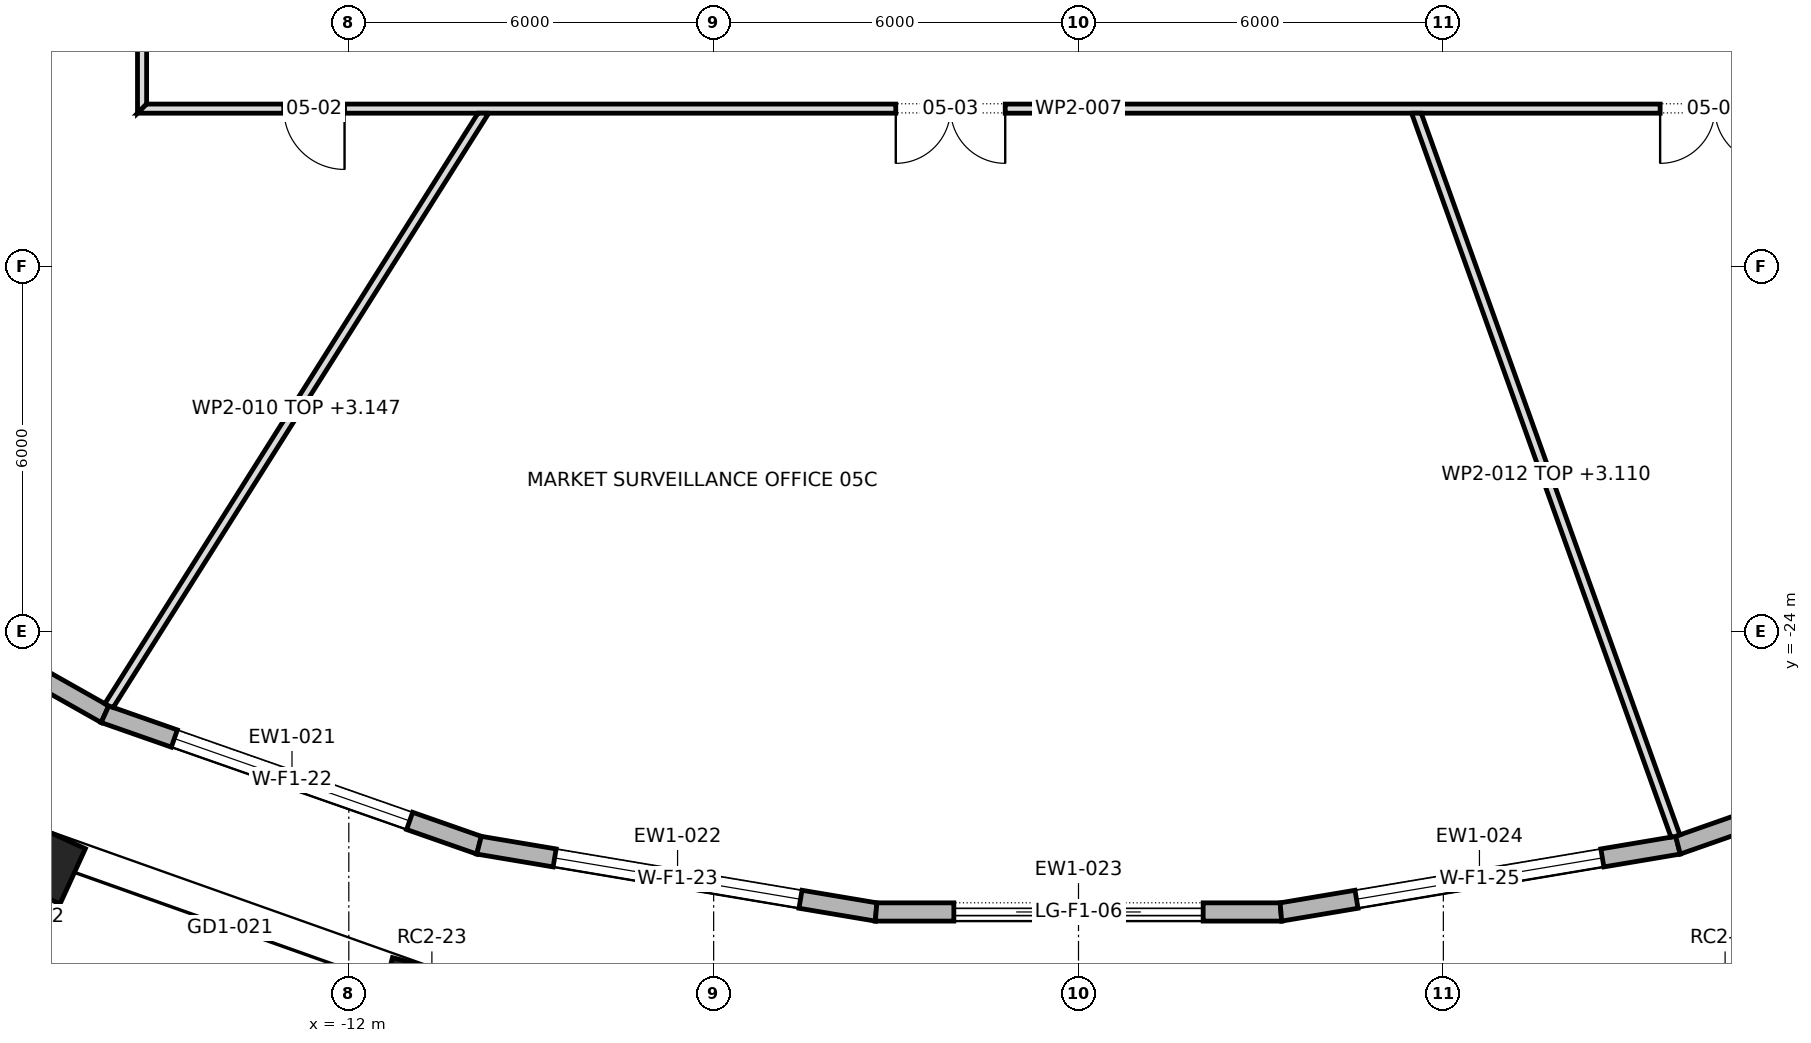
"""IFC4 building model, lengths in metres.
Left out: names, types, materials, properties, quantities, classifications, styles, units other than length and angle.
Written with IfcOpenShell. Run it as: python <this file> out.ifc"""

import sys

from ifc_helpers import new_model, si_unit, direction, frame, frame_2d, origin, origin_2d, place, context, subcontext, project, spatial, polyline, rectangle, outline, extrude, element, fill, save


model = new_model("IFC4")
c1 = context("Model", 3, precision=1e-05, world=origin(), true_north=direction((0.0, 1.0)))
c2 = subcontext(c1, "Body", "Model", "MODEL_VIEW")
j1 = project(units=[si_unit("LENGTHUNIT", "METRE"), si_unit("PLANEANGLEUNIT", "RADIAN")], contexts=[c1])
p1 = place(None, origin())
s1 = spatial("IfcSite", under=j1, at=p1, CompositionType="ELEMENT")
p2 = place(p1, origin())
s2 = spatial("IfcBuilding", under=s1, at=p2, CompositionType="ELEMENT")
p3 = place(p2, frame((0.0, 0.0, 73.9)))
s3 = spatial("IfcBuildingStorey", under=s2, at=p3, CompositionType="ELEMENT", Elevation=73.9)
for number, where, z_axis, x_axis in (
    (1, (-17.268, -27.691, 0.0), (0.0, 0.0, 1.0), (0.909, -0.417, 0.0)),
    (2, (-10.634, -30.046, 0.0), (0.0, 0.0, 1.0), (0.968, -0.252, 0.0)),
    (3, (10.634, -30.046, 0.0), (0.0, 0.0, 1.0), (0.968, 0.252, 0.0)),
):
    element("IfcColumn", number, at=place(p3, frame(where, z_axis=z_axis, x_axis=x_axis)), inside=s3, PredefinedType="COLUMN", context=c2, shape_type="SweptSolid", body=[
        extrude(rectangle(XDim=1.6, YDim=1.0, at=origin_2d()), origin(), (0.0, 0.0, 1.0), 4.2),
    ])
p4 = place(p3, frame((-21.549, -22.231, 0.0), z_axis=(0.0, 0.0, 1.0), x_axis=(0.870710061474, -0.491796694629, 0.0)))
e4 = element("IfcWall", 4, at=p4, inside=s3, PredefinedType="STANDARD", context=c2, shape_type="SweptSolid", body=[
    extrude(outline(polyline([(-0.014, -0.15), (6.374, -0.15), (6.347, 0.15), (0.014, 0.15), (-0.014, -0.15)])), origin(), (0.0, 0.0, 1.0), 3.9),
])
p5 = place(p4, frame((1.13, 0.0, 0.6)))
e5 = element("IfcOpeningElement", 5, at=p5, cuts=e4, PredefinedType="OPENING", context=c2, shape_type="SweptSolid", body=[
    extrude(rectangle(XDim=4.1, YDim=2.85, at=frame_2d((2.05, 1.425))), frame((0.0, 0.162, 0.0), z_axis=(0.0, -1.0, 0.0), x_axis=(1.0, 0.0, 0.0)), (0.0, 0.0, 1.0), 0.324),
])
p6 = place(p3, frame((-16.01, -25.359, 0.0), z_axis=(0.0, 0.0, 1.0), x_axis=(0.943815136299, -0.330473884736, 0.0)))
e6 = element("IfcWall", 6, at=p6, inside=s3, PredefinedType="STANDARD", context=c2, shape_type="SweptSolid", body=[
    extrude(outline(polyline([(-0.013, -0.15), (6.531, -0.15), (6.505, 0.15), (0.013, 0.15), (-0.013, -0.15)])), origin(), (0.0, 0.0, 1.0), 3.9),
])
p7 = place(p6, frame((1.209, 0.0, 0.6)))
e7 = element("IfcOpeningElement", 7, at=p7, cuts=e6, PredefinedType="OPENING", context=c2, shape_type="SweptSolid", body=[
    extrude(rectangle(XDim=4.1, YDim=2.85, at=frame_2d((2.05, 1.425))), frame((0.0, 0.162, 0.0), z_axis=(0.0, -1.0, 0.0), x_axis=(1.0, 0.0, 0.0)), (0.0, 0.0, 1.0), 0.324),
])
p8 = place(p3, frame((-9.858, -27.513, 0.0), z_axis=(0.0, 0.0, 1.0), x_axis=(0.986157735925, -0.165809890767, 0.0)))
e8 = element("IfcWall", 8, at=p8, inside=s3, PredefinedType="STANDARD", context=c2, shape_type="SweptSolid", body=[
    extrude(outline(polyline([(-0.013, -0.15), (6.634, -0.15), (6.609, 0.15), (0.013, 0.15), (-0.013, -0.15)])), origin(), (0.0, 0.0, 1.0), 3.9),
])
p9 = place(p8, frame((1.261, 0.0, 0.6)))
e9 = element("IfcOpeningElement", 9, at=p9, cuts=e8, PredefinedType="OPENING", context=c2, shape_type="SweptSolid", body=[
    extrude(rectangle(XDim=4.1, YDim=2.85, at=frame_2d((2.05, 1.425))), frame((0.0, 0.162, 0.0), z_axis=(0.0, -1.0, 0.0), x_axis=(1.0, 0.0, 0.0)), (0.0, 0.0, 1.0), 0.324),
])
p10 = place(p3, frame((-3.329, -28.611, 0.0), z_axis=(0.0, 0.0, 1.0), x_axis=(1.0, 0.0, 0.0)))
e10 = element("IfcWall", 10, at=p10, inside=s3, PredefinedType="STANDARD", context=c2, shape_type="SweptSolid", body=[
    extrude(outline(polyline([(-0.012, -0.15), (6.67, -0.15), (6.645, 0.15), (0.012, 0.15), (-0.012, -0.15)])), origin(), (0.0, 0.0, 1.0), 3.9),
])
p11 = place(p10, frame((1.279, 0.0, 0.0)))
e11 = element("IfcOpeningElement", 11, at=p11, cuts=e10, PredefinedType="OPENING", context=c2, shape_type="SweptSolid", body=[
    extrude(rectangle(XDim=4.1, YDim=3.45, at=frame_2d((2.05, 1.725))), frame((0.0, 0.162, 0.0), z_axis=(0.0, -1.0, 0.0), x_axis=(1.0, 0.0, 0.0)), (0.0, 0.0, 1.0), 0.324),
])
p12 = place(p3, frame((3.329, -28.611, 0.0), z_axis=(0.0, 0.0, 1.0), x_axis=(0.986157735925, 0.165809890767, 0.0)))
e12 = element("IfcWall", 12, at=p12, inside=s3, PredefinedType="STANDARD", context=c2, shape_type="SweptSolid", body=[
    extrude(outline(polyline([(-0.012, -0.15), (6.634, -0.15), (6.609, 0.15), (0.012, 0.15), (-0.012, -0.15)])), origin(), (0.0, 0.0, 1.0), 3.9),
])
p13 = place(p12, frame((1.261, 0.0, 0.6)))
e13 = element("IfcOpeningElement", 13, at=p13, cuts=e12, PredefinedType="OPENING", context=c2, shape_type="SweptSolid", body=[
    extrude(rectangle(XDim=4.1, YDim=2.85, at=frame_2d((2.05, 1.425))), frame((0.0, 0.162, 0.0), z_axis=(0.0, -1.0, 0.0), x_axis=(1.0, 0.0, 0.0)), (0.0, 0.0, 1.0), 0.324),
])
p14 = place(p3, frame((9.858, -27.513, 0.0), z_axis=(0.0, 0.0, 1.0), x_axis=(0.943815136299, 0.330473884736, 0.0)))
e14 = element("IfcWall", 14, at=p14, inside=s3, PredefinedType="STANDARD", context=c2, shape_type="SweptSolid", body=[
    extrude(outline(polyline([(-0.013, -0.15), (6.531, -0.15), (6.505, 0.15), (0.013, 0.15), (-0.013, -0.15)])), origin(), (0.0, 0.0, 1.0), 3.9),
])
p15 = place(p14, frame((1.209, 0.0, 0.6)))
e15 = element("IfcOpeningElement", 15, at=p15, cuts=e14, PredefinedType="OPENING", context=c2, shape_type="SweptSolid", body=[
    extrude(rectangle(XDim=4.1, YDim=2.85, at=frame_2d((2.05, 1.425))), frame((0.0, 0.162, 0.0), z_axis=(0.0, -1.0, 0.0), x_axis=(1.0, 0.0, 0.0)), (0.0, 0.0, 1.0), 0.324),
])
p16 = place(p3, frame((-26.158, -18.142, 0.0), z_axis=(0.0, 0.0, 1.0), x_axis=(0.821670699987, 0.569962508226, 0.0)))
e16 = element("IfcWall", 16, at=p16, inside=s3, PredefinedType="PARTITIONING", context=c2, shape_type="SweptSolid", body=[
    extrude(outline(polyline([(0.024, -0.075), (1.87, -0.075), (3.717, -0.075), (5.563, -0.075), (7.41, -0.075), (9.257, -0.075), (11.103, -0.075), (12.95, -0.075), (13.003, 0.002), (13.003, 0.002), (13.053, 0.074), (13.053, 0.075), (11.279, 0.075), (9.504, 0.075), (7.729, 0.075), (7.728, 0.073), (7.726, 0.075), (5.794, 0.075), (3.863, 0.075), (1.931, 0.075), (0.0, 0.075), (0.0, 0.073), (0.005, -0.004), (0.024, -0.075)])), origin(), (0.0, 0.0, 1.0), 2.91),
])
p17 = place(p3, frame((-15.4, -15.475, 0.0), z_axis=(0.0, 0.0, 1.0), x_axis=(0.0, 1.0, 0.0)))
e17 = element("IfcWall", 17, at=p17, inside=s3, PredefinedType="PARTITIONING", context=c2, shape_type="SweptSolid", body=[
    extrude(outline(polyline([(0.15, -0.075), (2.066, -0.075), (3.981, -0.075), (5.897, -0.075), (7.812, -0.075), (9.728, -0.075), (11.644, -0.075), (13.56, -0.075), (15.475, -0.075), (17.391, -0.075), (19.306, -0.075), (21.222, -0.075), (23.138, -0.075), (25.053, -0.075), (26.969, -0.075), (28.885, -0.075), (30.8, -0.075), (30.95, 0.075), (29.016, 0.075), (27.081, 0.075), (25.147, 0.075), (23.212, 0.075), (21.278, 0.075), (19.344, 0.075), (17.409, 0.075), (15.475, 0.075), (13.541, 0.075), (11.606, 0.075), (9.672, 0.075), (7.738, 0.075), (5.803, 0.075), (3.869, 0.075), (1.935, 0.075), (0.0, 0.075), (0.15, -0.075)])), origin(), (0.0, 0.0, 1.0), 3.9),
])
p18 = place(p17, frame((10.275, 0.0, 0.0)))
e18 = element("IfcOpeningElement", 18, at=p18, cuts=e17, PredefinedType="OPENING", context=c2, shape_type="SweptSolid", body=[
    extrude(rectangle(XDim=1.0, YDim=2.1, at=frame_2d((0.5, 1.05))), frame((0.0, 0.087, 0.0), z_axis=(0.0, -1.0, 0.0), x_axis=(1.0, 0.0, 0.0)), (0.0, 0.0, 1.0), 0.174),
])
p19 = place(p17, frame((22.915, 0.0, 0.0)))
e19 = element("IfcOpeningElement", 19, at=p19, cuts=e17, PredefinedType="OPENING", context=c2, shape_type="SweptSolid", body=[
    extrude(rectangle(XDim=1.8, YDim=2.1, at=frame_2d((0.9, 1.05))), frame((0.0, 0.087, 0.0), z_axis=(0.0, -1.0, 0.0), x_axis=(1.0, 0.0, 0.0)), (0.0, 0.0, 1.0), 0.174),
])
p20 = place(p3, frame((-15.475, -15.4, 0.0), z_axis=(0.0, 0.0, 1.0), x_axis=(1.0, 0.0, 0.0)))
e20 = element("IfcWall", 20, at=p20, inside=s3, PredefinedType="PARTITIONING", context=c2, shape_type="SweptSolid", body=[
    extrude(outline(polyline([(0.0, -0.075), (1.935, -0.075), (3.869, -0.075), (5.803, -0.075), (7.738, -0.075), (9.672, -0.075), (11.606, -0.075), (13.541, -0.075), (15.475, -0.075), (17.409, -0.075), (19.344, -0.075), (21.278, -0.075), (23.212, -0.075), (25.147, -0.075), (27.081, -0.075), (29.016, -0.075), (30.95, -0.075), (30.8, 0.075), (28.885, 0.075), (26.969, 0.075), (25.053, 0.075), (23.138, 0.075), (21.222, 0.075), (19.306, 0.075), (17.391, 0.075), (15.475, 0.075), (13.56, 0.075), (11.644, 0.075), (9.728, 0.075), (7.812, 0.075), (5.897, 0.075), (3.981, 0.075), (2.066, 0.075), (0.15, 0.075), (0.0, -0.075)])), origin(), (0.0, 0.0, 1.0), 3.9),
])
p21 = place(p20, frame((2.405, 0.0, 0.0)))
e21 = element("IfcOpeningElement", 21, at=p21, cuts=e20, PredefinedType="OPENING", context=c2, shape_type="SweptSolid", body=[
    extrude(rectangle(XDim=1.0, YDim=2.1, at=frame_2d((0.5, 1.05))), frame((0.0, 0.087, 0.0), z_axis=(0.0, -1.0, 0.0), x_axis=(1.0, 0.0, 0.0)), (0.0, 0.0, 1.0), 0.174),
])
p22 = place(p20, frame((12.47, 0.0, 0.0)))
e22 = element("IfcOpeningElement", 22, at=p22, cuts=e20, PredefinedType="OPENING", context=c2, shape_type="SweptSolid", body=[
    extrude(rectangle(XDim=1.8, YDim=2.1, at=frame_2d((0.9, 1.05))), frame((0.0, 0.087, 0.0), z_axis=(0.0, -1.0, 0.0), x_axis=(1.0, 0.0, 0.0)), (0.0, 0.0, 1.0), 0.174),
])
p23 = place(p20, frame((25.04, 0.0, 0.0)))
e23 = element("IfcOpeningElement", 23, at=p23, cuts=e20, PredefinedType="OPENING", context=c2, shape_type="SweptSolid", body=[
    extrude(rectangle(XDim=1.8, YDim=2.1, at=frame_2d((0.9, 1.05))), frame((0.0, 0.087, 0.0), z_axis=(0.0, -1.0, 0.0), x_axis=(1.0, 0.0, 0.0)), (0.0, 0.0, 1.0), 0.174),
])
p24 = place(p3, frame((-9.762, -15.435, 0.0), z_axis=(0.0, 0.0, 1.0), x_axis=(-0.534199196173, -0.845358633249, 0.0)))
e24 = element("IfcWall", 24, at=p24, inside=s3, PredefinedType="PARTITIONING", context=c2, shape_type="SweptSolid", body=[
    extrude(outline(polyline([(11.581, -0.075), (11.581, -0.066), (11.578, -0.001), (11.56, 0.075), (9.633, 0.075), (7.707, 0.075), (5.78, 0.075), (3.853, 0.075), (1.927, 0.075), (0.0, 0.075), (0.0, 0.075), (0.095, -0.075), (2.009, -0.075), (3.923, -0.075), (5.838, -0.075), (7.752, -0.075), (9.667, -0.075), (11.581, -0.075)])), origin(), (0.0, 0.0, 1.0), 3.147),
])
p25 = place(p3, frame((5.548, -15.45, 0.0), z_axis=(0.0, 0.0, 1.0), x_axis=(0.337357475529, -0.941376616294, 0.0)))
e25 = element("IfcWall", 25, at=p25, inside=s3, PredefinedType="PARTITIONING", context=c2, shape_type="SweptSolid", body=[
    extrude(outline(polyline([(0.0, -0.075), (1.807, -0.075), (3.613, -0.075), (5.42, -0.075), (7.226, -0.075), (9.033, -0.075), (10.84, -0.075), (12.646, -0.075), (12.66, 0.002), (12.66, 0.018), (12.66, 0.075), (10.859, 0.075), (9.058, 0.075), (7.257, 0.075), (5.456, 0.075), (3.655, 0.075), (1.854, 0.075), (0.053, 0.075), (0.0, -0.074), (0.0, -0.075)])), origin(), (0.0, 0.0, 1.0), 3.11),
])
p26 = place(p7, origin())
e26 = element("IfcWindow", 26, at=p26, inside=s3, PartitioningType="TRIPLE_PANEL_VERTICAL", PredefinedType="WINDOW", context=c2, shape_type="SweptSolid", body=[
    extrude(rectangle(XDim=4.1, YDim=2.85, at=frame_2d((2.05, 1.425))), frame((0.0, 0.03, 0.0), z_axis=(0.0, -1.0, 0.0), x_axis=(1.0, 0.0, 0.0)), (0.0, 0.0, 1.0), 0.06),
])
fill(e7, e26)
p27 = place(p9, origin())
e27 = element("IfcWindow", 27, at=p27, inside=s3, PartitioningType="TRIPLE_PANEL_VERTICAL", PredefinedType="WINDOW", context=c2, shape_type="SweptSolid", body=[
    extrude(rectangle(XDim=4.1, YDim=2.85, at=frame_2d((2.05, 1.425))), frame((0.0, 0.03, 0.0), z_axis=(0.0, -1.0, 0.0), x_axis=(1.0, 0.0, 0.0)), (0.0, 0.0, 1.0), 0.06),
])
fill(e9, e27)
p28 = place(p11, origin())
e28 = element("IfcDoor", 28, at=p28, inside=s3, OperationType="DOUBLE_DOOR_SLIDING", PredefinedType="DOOR", context=c2, shape_type="SweptSolid", body=[
    extrude(rectangle(XDim=4.1, YDim=3.45, at=frame_2d((2.05, 1.725))), frame((0.0, 0.025, 0.0), z_axis=(0.0, -1.0, 0.0), x_axis=(1.0, 0.0, 0.0)), (0.0, 0.0, 1.0), 0.05),
])
fill(e11, e28)
p29 = place(p13, origin())
e29 = element("IfcWindow", 29, at=p29, inside=s3, PartitioningType="TRIPLE_PANEL_VERTICAL", PredefinedType="WINDOW", context=c2, shape_type="SweptSolid", body=[
    extrude(rectangle(XDim=4.1, YDim=2.85, at=frame_2d((2.05, 1.425))), frame((0.0, 0.03, 0.0), z_axis=(0.0, -1.0, 0.0), x_axis=(1.0, 0.0, 0.0)), (0.0, 0.0, 1.0), 0.06),
])
fill(e13, e29)
p30 = place(p21, frame((1.0, 0.0, 0.0), z_axis=(0.0, 0.0, 1.0), x_axis=(-1.0, 0.0, 0.0)))
e30 = element("IfcDoor", 30, at=p30, inside=s3, OperationType="SINGLE_SWING_RIGHT", PredefinedType="DOOR", context=c2, shape_type="SweptSolid", body=[
    extrude(rectangle(XDim=1.0, YDim=2.1, at=frame_2d((0.5, 1.05))), frame((0.0, 0.025, 0.0), z_axis=(0.0, -1.0, 0.0), x_axis=(1.0, 0.0, 0.0)), (0.0, 0.0, 1.0), 0.05),
])
fill(e21, e30)
p31 = place(p22, frame((1.8, 0.0, 0.0), z_axis=(0.0, 0.0, 1.0), x_axis=(-1.0, 0.0, 0.0)))
e31 = element("IfcDoor", 31, at=p31, inside=s3, OperationType="DOUBLE_DOOR_SINGLE_SWING", PredefinedType="DOOR", context=c2, shape_type="SweptSolid", body=[
    extrude(rectangle(XDim=1.8, YDim=2.1, at=frame_2d((0.9, 1.05))), frame((0.0, 0.025, 0.0), z_axis=(0.0, -1.0, 0.0), x_axis=(1.0, 0.0, 0.0)), (0.0, 0.0, 1.0), 0.05),
])
fill(e22, e31)
p32 = place(p23, frame((1.8, 0.0, 0.0), z_axis=(0.0, 0.0, 1.0), x_axis=(-1.0, 0.0, 0.0)))
e32 = element("IfcDoor", 32, at=p32, inside=s3, OperationType="DOUBLE_DOOR_SINGLE_SWING", PredefinedType="DOOR", context=c2, shape_type="SweptSolid", body=[
    extrude(rectangle(XDim=1.8, YDim=2.1, at=frame_2d((0.9, 1.05))), frame((0.0, 0.025, 0.0), z_axis=(0.0, -1.0, 0.0), x_axis=(1.0, 0.0, 0.0)), (0.0, 0.0, 1.0), 0.05),
])
fill(e23, e32)
save(model, sys.argv[1])
